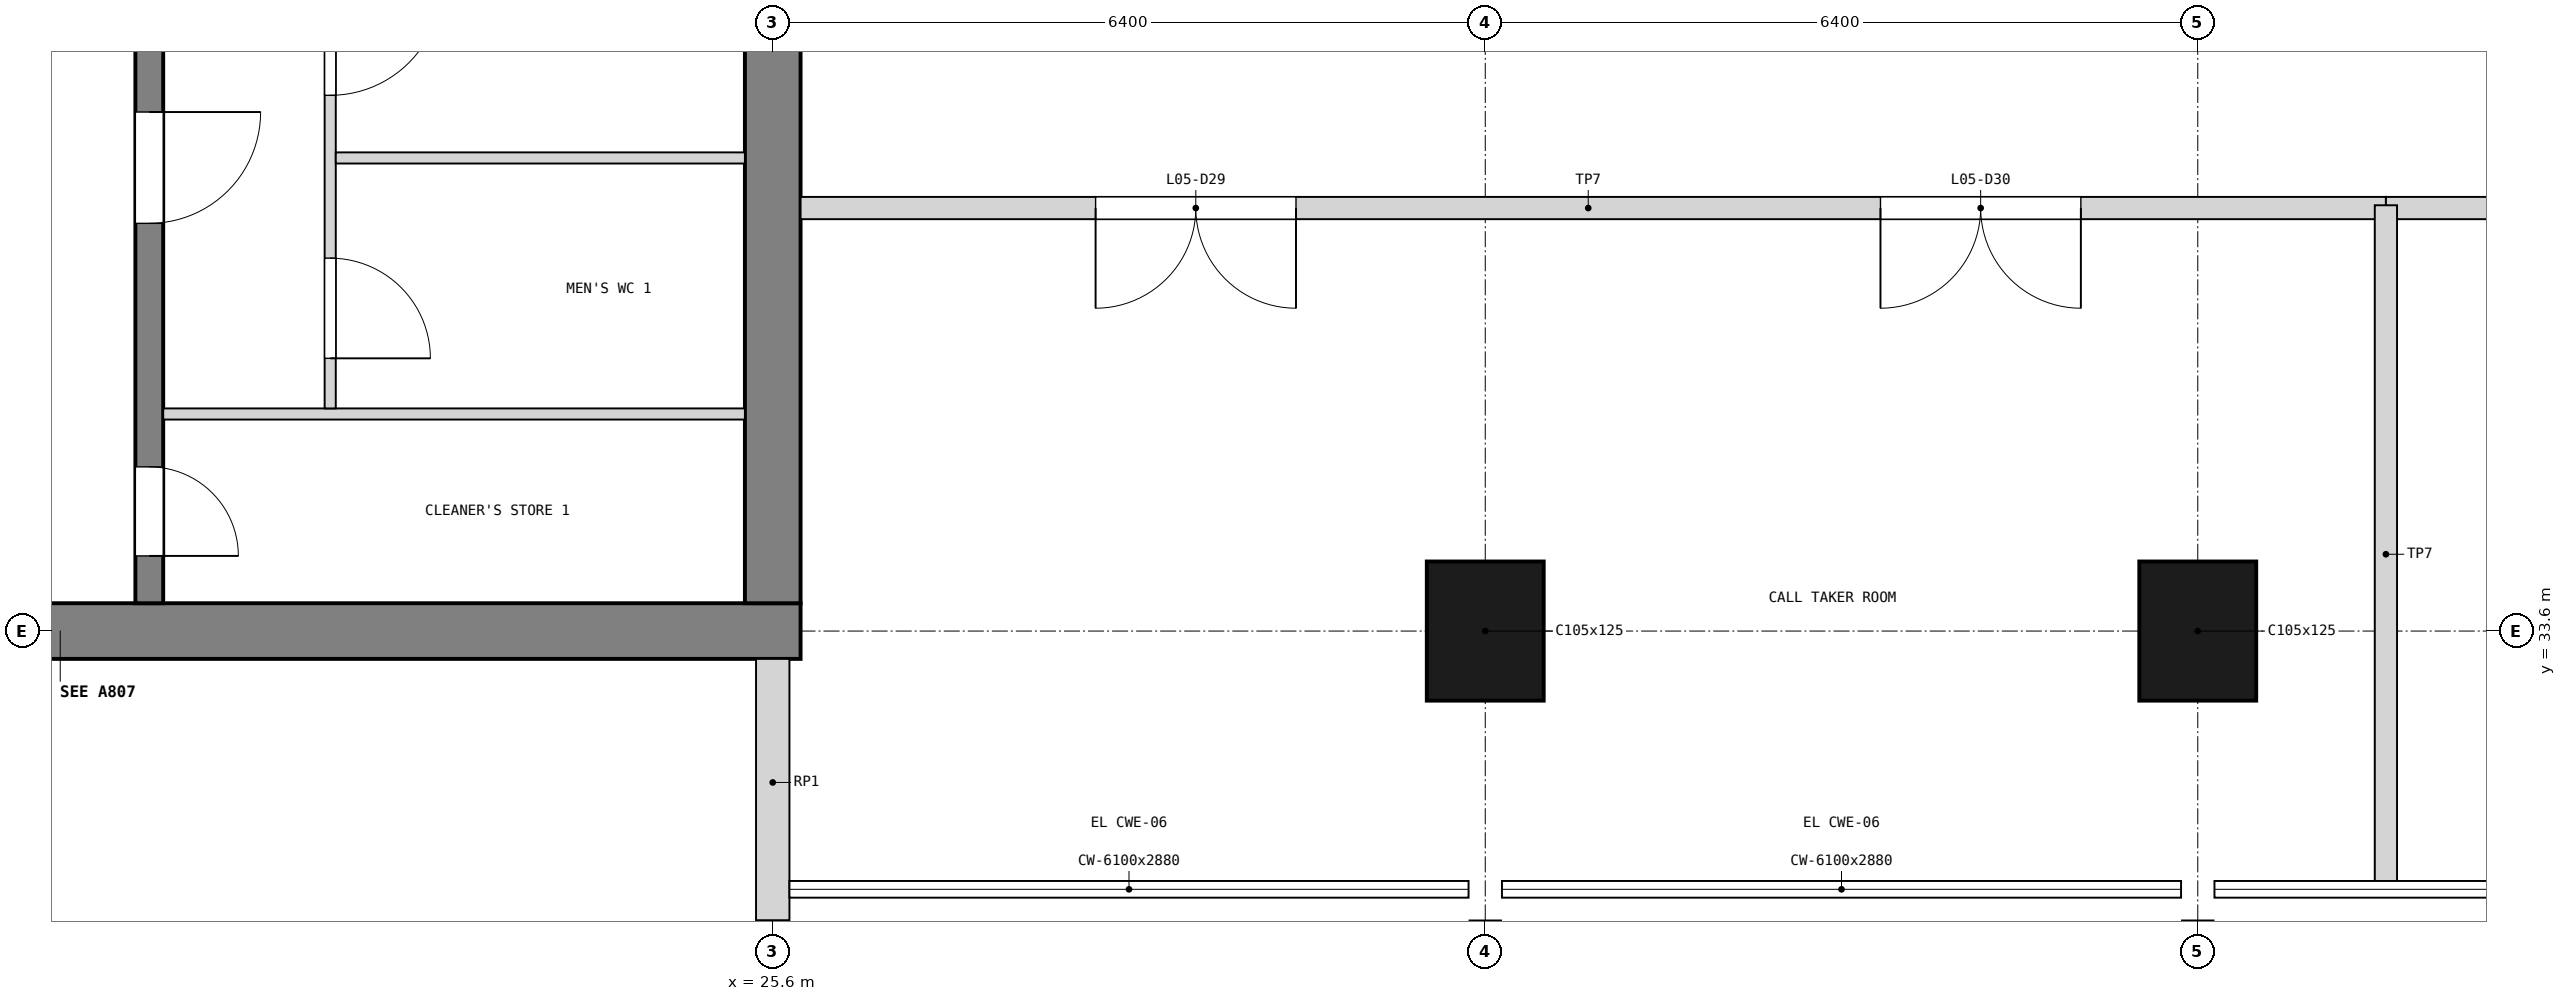
"""IFC4 building model, lengths in metres.
Left out: names, types, materials, properties, quantities, classifications, styles, units other than length and angle.
Written with IfcOpenShell. Run it as: python <this file> out.ifc"""

import sys

from ifc_helpers import new_model, si_unit, direction, frame, frame_2d, origin, origin_2d, place, context, subcontext, project, spatial, rectangle, extrude, element, fill, save


model = new_model("IFC4")
c1 = context("Model", 3, precision=1e-05, world=origin(), true_north=direction((0.0, 1.0)))
c2 = subcontext(c1, "Body", "Model", "MODEL_VIEW")
j1 = project(units=[si_unit("LENGTHUNIT", "METRE"), si_unit("PLANEANGLEUNIT", "RADIAN")], contexts=[c1])
p1 = place(None, origin())
s1 = spatial("IfcSite", under=j1, at=p1, CompositionType="ELEMENT")
p2 = place(p1, origin())
s2 = spatial("IfcBuilding", under=s1, at=p2, CompositionType="ELEMENT")
p3 = place(p2, frame((0.0, 0.0, 21.0)))
s3 = spatial("IfcBuildingStorey", under=s2, at=p3, CompositionType="ELEMENT", Elevation=21.0)
p4 = place(p3, frame((12.55, 33.6, 0.0), z_axis=(0.0, 0.0, 1.0), x_axis=(1.0, 0.0, 0.0)))
e1 = element("IfcWall", 1, at=p4, inside=s3, PredefinedType="SHEAR", context=c2, shape_type="SweptSolid", body=[
    extrude(rectangle(XDim=13.3, YDim=0.5, at=frame_2d((6.65, 0.0))), origin(), (0.0, 0.0, 1.0), 3.9),
])
p5 = place(p4, frame((1.85, 0.0, 1.0)))
e2 = element("IfcOpeningElement", 2, at=p5, cuts=e1, PredefinedType="OPENING", context=c2, shape_type="SweptSolid", body=[
    extrude(rectangle(XDim=0.4, YDim=2.0, at=frame_2d((0.2, 1.0))), frame((0.0, 0.26, 0.0), z_axis=(0.0, -1.0, 0.0), x_axis=(1.0, 0.0, 0.0)), (0.0, 0.0, 1.0), 0.52),
])
p6 = place(p3, frame((25.6, 33.85, 0.0), z_axis=(0.0, 0.0, 1.0), x_axis=(0.0, 1.0, 0.0)))
e3 = element("IfcWall", 3, at=p6, inside=s3, PredefinedType="SHEAR", context=c2, shape_type="SweptSolid", body=[
    extrude(rectangle(XDim=18.7, YDim=0.5, at=frame_2d((9.35, 0.0))), origin(), (0.0, 0.0, 1.0), 3.9),
])
p7 = place(p6, frame((8.35, 0.0, 0.0)))
e4 = element("IfcOpeningElement", 4, at=p7, cuts=e3, PredefinedType="OPENING", context=c2, shape_type="SweptSolid", body=[
    extrude(rectangle(XDim=2.0, YDim=2.1, at=frame_2d((1.0, 1.05))), frame((0.0, 0.26, 0.0), z_axis=(0.0, -1.0, 0.0), x_axis=(1.0, 0.0, 0.0)), (0.0, 0.0, 1.0), 0.52),
])
for number, where, z_axis, x_axis in (
    (5, (32.0, 33.6, 0.0), (0.0, 0.0, 1.0), (1.0, 0.0, 0.0)),
    (6, (38.4, 33.6, 0.0), (0.0, 0.0, 1.0), (1.0, 0.0, 0.0)),
):
    element("IfcColumn", number, at=place(p3, frame(where, z_axis=z_axis, x_axis=x_axis)), inside=s3, PredefinedType="COLUMN", context=c2, shape_type="SweptSolid", body=[
        extrude(rectangle(XDim=1.05, YDim=1.25, at=origin_2d()), origin(), (0.0, 0.0, 1.0), 3.9),
    ])
p8 = place(p3, frame((25.6, 31.0, 0.0), z_axis=(0.0, 0.0, 1.0), x_axis=(0.0, 1.0, 0.0)))
e7 = element("IfcWall", 7, at=p8, inside=s3, PredefinedType="SOLIDWALL", context=c2, shape_type="SweptSolid", body=[
    extrude(rectangle(XDim=2.35, YDim=0.3, at=frame_2d((1.175, 0.0))), origin(), (0.0, 0.0, 1.0), 2.88),
])
p9 = place(p3, frame((20.0, 33.85, 0.0), z_axis=(0.0, 0.0, 1.0), x_axis=(0.0, 1.0, 0.0)))
e8 = element("IfcWall", 8, at=p9, inside=s3, PredefinedType="SOLIDWALL", context=c2, shape_type="SweptSolid", body=[
    extrude(rectangle(XDim=6.075, YDim=0.25, at=frame_2d((3.038, 0.0))), origin(), (0.0, 0.0, 1.0), 3.6),
])
p10 = place(p9, frame((0.425, 0.0, 0.0)))
e9 = element("IfcOpeningElement", 9, at=p10, cuts=e8, PredefinedType="OPENING", context=c2, shape_type="SweptSolid", body=[
    extrude(rectangle(XDim=0.8, YDim=2.1, at=frame_2d((0.4, 1.05))), frame((0.0, 0.135, 0.0), z_axis=(0.0, -1.0, 0.0), x_axis=(1.0, 0.0, 0.0)), (0.0, 0.0, 1.0), 0.27),
])
p11 = place(p9, frame((3.413, 0.0, 0.0)))
e10 = element("IfcOpeningElement", 10, at=p11, cuts=e8, PredefinedType="OPENING", context=c2, shape_type="SweptSolid", body=[
    extrude(rectangle(XDim=1.0, YDim=2.1, at=frame_2d((0.5, 1.05))), frame((0.0, 0.135, 0.0), z_axis=(0.0, -1.0, 0.0), x_axis=(1.0, 0.0, 0.0)), (0.0, 0.0, 1.0), 0.27),
])
p12 = place(p3, frame((20.125, 35.55, 0.0), z_axis=(0.0, 0.0, 1.0), x_axis=(1.0, 0.0, 0.0)))
e11 = element("IfcWall", 11, at=p12, inside=s3, PredefinedType="PARTITIONING", context=c2, shape_type="SweptSolid", body=[
    extrude(rectangle(XDim=5.225, YDim=0.1, at=frame_2d((2.613, 0.0))), origin(), (0.0, 0.0, 1.0), 3.6),
])
p13 = place(p3, frame((21.625, 35.6, 0.0), z_axis=(0.0, 0.0, 1.0), x_axis=(0.0, 1.0, 0.0)))
e12 = element("IfcWall", 12, at=p13, inside=s3, PredefinedType="PARTITIONING", context=c2, shape_type="SweptSolid", body=[
    extrude(rectangle(XDim=4.325, YDim=0.1, at=frame_2d((2.163, 0.0))), origin(), (0.0, 0.0, 1.0), 3.6),
])
p14 = place(p13, frame((0.45, 0.0, 0.0)))
e13 = element("IfcOpeningElement", 13, at=p14, cuts=e12, PredefinedType="OPENING", context=c2, shape_type="SweptSolid", body=[
    extrude(rectangle(XDim=0.9, YDim=2.1, at=frame_2d((0.45, 1.05))), frame((0.0, 0.06, 0.0), z_axis=(0.0, -1.0, 0.0), x_axis=(1.0, 0.0, 0.0)), (0.0, 0.0, 1.0), 0.12),
])
p15 = place(p13, frame((2.812, 0.0, 0.0)))
e14 = element("IfcOpeningElement", 14, at=p15, cuts=e12, PredefinedType="OPENING", context=c2, shape_type="SweptSolid", body=[
    extrude(rectangle(XDim=1.0, YDim=2.1, at=frame_2d((0.5, 1.05))), frame((0.0, 0.06, 0.0), z_axis=(0.0, -1.0, 0.0), x_axis=(1.0, 0.0, 0.0)), (0.0, 0.0, 1.0), 0.12),
])
p16 = place(p3, frame((21.675, 37.85, 0.0), z_axis=(0.0, 0.0, 1.0), x_axis=(1.0, 0.0, 0.0)))
e15 = element("IfcWall", 15, at=p16, inside=s3, PredefinedType="PARTITIONING", context=c2, shape_type="SweptSolid", body=[
    extrude(rectangle(XDim=3.675, YDim=0.1, at=frame_2d((1.837, 0.0))), origin(), (0.0, 0.0, 1.0), 3.6),
])
p17 = place(p3, frame((25.85, 37.4, 0.0), z_axis=(0.0, 0.0, 1.0), x_axis=(1.0, 0.0, 0.0)))
e16 = element("IfcWall", 16, at=p17, inside=s3, PredefinedType="PARTITIONING", context=c2, shape_type="SweptSolid", body=[
    extrude(rectangle(XDim=14.24, YDim=0.2, at=frame_2d((7.12, 0.0))), origin(), (0.0, 0.0, 1.0), 3.68),
])
p18 = place(p17, frame((2.65, 0.0, 0.0)))
e17 = element("IfcOpeningElement", 17, at=p18, cuts=e16, PredefinedType="OPENING", context=c2, shape_type="SweptSolid", body=[
    extrude(rectangle(XDim=1.8, YDim=2.1, at=frame_2d((0.9, 1.05))), frame((0.0, 0.11, 0.0), z_axis=(0.0, -1.0, 0.0), x_axis=(1.0, 0.0, 0.0)), (0.0, 0.0, 1.0), 0.22),
])
p19 = place(p17, frame((9.7, 0.0, 0.0)))
e18 = element("IfcOpeningElement", 18, at=p19, cuts=e16, PredefinedType="OPENING", context=c2, shape_type="SweptSolid", body=[
    extrude(rectangle(XDim=1.8, YDim=2.1, at=frame_2d((0.9, 1.05))), frame((0.0, 0.11, 0.0), z_axis=(0.0, -1.0, 0.0), x_axis=(1.0, 0.0, 0.0)), (0.0, 0.0, 1.0), 0.22),
])
p20 = place(p3, frame((40.09, 37.4, 0.0), z_axis=(0.0, 0.0, 1.0), x_axis=(1.0, 0.0, 0.0)))
e19 = element("IfcWall", 19, at=p20, inside=s3, PredefinedType="PARTITIONING", context=c2, shape_type="SweptSolid", body=[
    extrude(rectangle(XDim=7.91, YDim=0.2, at=frame_2d((3.955, 0.0))), origin(), (0.0, 0.0, 1.0), 3.68),
])
p21 = place(p20, frame((3.46, 0.0, 0.0)))
e20 = element("IfcOpeningElement", 20, at=p21, cuts=e19, PredefinedType="OPENING", context=c2, shape_type="SweptSolid", body=[
    extrude(rectangle(XDim=1.0, YDim=2.1, at=frame_2d((0.5, 1.05))), frame((0.0, 0.11, 0.0), z_axis=(0.0, -1.0, 0.0), x_axis=(1.0, 0.0, 0.0)), (0.0, 0.0, 1.0), 0.22),
])
p22 = place(p3, frame((40.09, 31.3, 0.0), z_axis=(0.0, 0.0, 1.0), x_axis=(0.0, 1.0, 0.0)))
e21 = element("IfcWall", 21, at=p22, inside=s3, PredefinedType="PARTITIONING", context=c2, shape_type="SweptSolid", body=[
    extrude(rectangle(XDim=6.125, YDim=0.2, at=frame_2d((3.062, 0.0))), origin(), (0.0, 0.0, 1.0), 3.68),
])
p23 = place(p10, frame((0.8, 0.0, 0.0), z_axis=(0.0, 0.0, 1.0), x_axis=(-1.0, 0.0, 0.0)))
e22 = element("IfcDoor", 22, at=p23, inside=s3, OperationType="SINGLE_SWING_RIGHT", PredefinedType="DOOR", context=c2, shape_type="SweptSolid", body=[
    extrude(rectangle(XDim=0.8, YDim=2.1, at=frame_2d((0.4, 1.05))), frame((0.0, 0.025, 0.0), z_axis=(0.0, -1.0, 0.0), x_axis=(1.0, 0.0, 0.0)), (0.0, 0.0, 1.0), 0.05),
])
fill(e9, e22)
p24 = place(p11, frame((1.0, 0.0, 0.0), z_axis=(0.0, 0.0, 1.0), x_axis=(-1.0, 0.0, 0.0)))
e23 = element("IfcDoor", 23, at=p24, inside=s3, OperationType="SINGLE_SWING_LEFT", PredefinedType="DOOR", context=c2, shape_type="SweptSolid", body=[
    extrude(rectangle(XDim=1.0, YDim=2.1, at=frame_2d((0.5, 1.05))), frame((0.0, 0.025, 0.0), z_axis=(0.0, -1.0, 0.0), x_axis=(1.0, 0.0, 0.0)), (0.0, 0.0, 1.0), 0.05),
])
fill(e10, e23)
p25 = place(p14, frame((0.9, 0.0, 0.0), z_axis=(0.0, 0.0, 1.0), x_axis=(-1.0, 0.0, 0.0)))
e24 = element("IfcDoor", 24, at=p25, inside=s3, OperationType="SINGLE_SWING_RIGHT", PredefinedType="DOOR", context=c2, shape_type="SweptSolid", body=[
    extrude(rectangle(XDim=0.9, YDim=2.1, at=frame_2d((0.45, 1.05))), frame((0.0, 0.025, 0.0), z_axis=(0.0, -1.0, 0.0), x_axis=(1.0, 0.0, 0.0)), (0.0, 0.0, 1.0), 0.05),
])
fill(e13, e24)
p26 = place(p15, frame((1.0, 0.0, 0.0), z_axis=(0.0, 0.0, 1.0), x_axis=(-1.0, 0.0, 0.0)))
e25 = element("IfcDoor", 25, at=p26, inside=s3, OperationType="SINGLE_SWING_LEFT", PredefinedType="DOOR", context=c2, shape_type="SweptSolid", body=[
    extrude(rectangle(XDim=1.0, YDim=2.1, at=frame_2d((0.5, 1.05))), frame((0.0, 0.025, 0.0), z_axis=(0.0, -1.0, 0.0), x_axis=(1.0, 0.0, 0.0)), (0.0, 0.0, 1.0), 0.05),
])
fill(e14, e25)
p27 = place(p18, frame((1.8, 0.0, 0.0), z_axis=(0.0, 0.0, 1.0), x_axis=(-1.0, 0.0, 0.0)))
e26 = element("IfcDoor", 26, at=p27, inside=s3, OperationType="DOUBLE_DOOR_SINGLE_SWING", PredefinedType="DOOR", context=c2, shape_type="SweptSolid", body=[
    extrude(rectangle(XDim=1.8, YDim=2.1, at=frame_2d((0.9, 1.05))), frame((0.0, 0.025, 0.0), z_axis=(0.0, -1.0, 0.0), x_axis=(1.0, 0.0, 0.0)), (0.0, 0.0, 1.0), 0.05),
])
fill(e17, e26)
p28 = place(p19, frame((1.8, 0.0, 0.0), z_axis=(0.0, 0.0, 1.0), x_axis=(-1.0, 0.0, 0.0)))
e27 = element("IfcDoor", 27, at=p28, inside=s3, OperationType="DOUBLE_DOOR_SINGLE_SWING", PredefinedType="DOOR", context=c2, shape_type="SweptSolid", body=[
    extrude(rectangle(XDim=1.8, YDim=2.1, at=frame_2d((0.9, 1.05))), frame((0.0, 0.025, 0.0), z_axis=(0.0, -1.0, 0.0), x_axis=(1.0, 0.0, 0.0)), (0.0, 0.0, 1.0), 0.05),
])
fill(e18, e27)
save(model, sys.argv[1])
